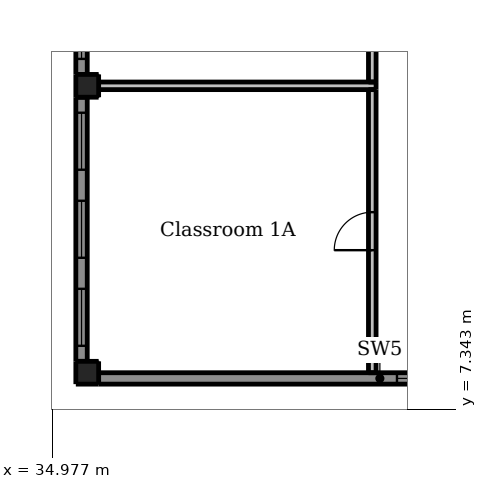
"""IFC4 building model, lengths in metres.
Left out: names, types, materials, properties, quantities, classifications, styles, units other than length and angle.
Written with IfcOpenShell. Run it as: python <this file> out.ifc"""

import sys

from ifc_helpers import new_model, si_unit, direction, frame, frame_2d, origin, origin_2d, place, context, subcontext, project, spatial, rectangle, extrude, element, fill, save


model = new_model("IFC4")
c1 = context("Model", 3, precision=1e-05, world=origin(), true_north=direction((0.0, 1.0)))
c2 = subcontext(c1, "Body", "Model", "MODEL_VIEW")
j1 = project(units=[si_unit("LENGTHUNIT", "METRE"), si_unit("PLANEANGLEUNIT", "RADIAN")], contexts=[c1])
p1 = place(None, origin())
s1 = spatial("IfcSite", under=j1, at=p1, CompositionType="ELEMENT")
p2 = place(p1, origin())
s2 = spatial("IfcBuilding", under=s1, at=p2, CompositionType="ELEMENT")
p3 = place(p2, frame((0.0, 0.0, 5.5)))
s3 = spatial("IfcBuildingStorey", under=s2, at=p3, CompositionType="ELEMENT", Elevation=5.5)
for number, where, z_axis, x_axis in (
    (1, (35.9, 8.3, -0.3), (0.0, 0.0, 1.0), (1.0, 0.0, 0.0)),
    (2, (35.9, 15.85, -0.3), (0.0, 0.0, 1.0), (1.0, 0.0, 0.0)),
):
    element("IfcColumn", number, at=place(p3, frame(where, z_axis=z_axis, x_axis=x_axis)), inside=s3, PredefinedType="COLUMN", context=c2, shape_type="SweptSolid", body=[
        extrude(rectangle(XDim=0.6, YDim=0.6, at=origin_2d()), origin(), (0.0, 0.0, 1.0), 4.5),
    ])
p4 = place(p3, frame((35.75, 8.6, 0.0), z_axis=(0.0, 0.0, 1.0), x_axis=(0.0, 1.0, 0.0)))
e3 = element("IfcWall", 3, at=p4, inside=s3, PredefinedType="SOLIDWALL", context=c2, shape_type="SweptSolid", body=[
    extrude(rectangle(XDim=6.95, YDim=0.3, at=frame_2d((3.475, 0.0))), origin(), (0.0, 0.0, 1.0), 3.3),
])
p5 = place(p4, frame((0.408, 0.0, 0.9)))
e4 = element("IfcOpeningElement", 4, at=p5, cuts=e3, PredefinedType="OPENING", context=c2, shape_type="SweptSolid", body=[
    extrude(rectangle(XDim=1.5, YDim=1.5, at=frame_2d((0.75, 0.75))), frame((0.0, 0.16, 0.0), z_axis=(0.0, -1.0, 0.0), x_axis=(1.0, 0.0, 0.0)), (0.0, 0.0, 1.0), 0.32),
])
p6 = place(p4, frame((2.725, 0.0, 0.9)))
e5 = element("IfcOpeningElement", 5, at=p6, cuts=e3, PredefinedType="OPENING", context=c2, shape_type="SweptSolid", body=[
    extrude(rectangle(XDim=1.5, YDim=1.5, at=frame_2d((0.75, 0.75))), frame((0.0, 0.16, 0.0), z_axis=(0.0, -1.0, 0.0), x_axis=(1.0, 0.0, 0.0)), (0.0, 0.0, 1.0), 0.32),
])
p7 = place(p4, frame((5.042, 0.0, 0.9)))
e6 = element("IfcOpeningElement", 6, at=p7, cuts=e3, PredefinedType="OPENING", context=c2, shape_type="SweptSolid", body=[
    extrude(rectangle(XDim=1.5, YDim=1.5, at=frame_2d((0.75, 0.75))), frame((0.0, 0.16, 0.0), z_axis=(0.0, -1.0, 0.0), x_axis=(1.0, 0.0, 0.0)), (0.0, 0.0, 1.0), 0.32),
])
p8 = place(p3, frame((35.75, 16.15, 0.0), z_axis=(0.0, 0.0, 1.0), x_axis=(0.0, 1.0, 0.0)))
e7 = element("IfcWall", 7, at=p8, inside=s3, PredefinedType="SOLIDWALL", context=c2, shape_type="SweptSolid", body=[
    extrude(rectangle(XDim=6.95, YDim=0.3, at=frame_2d((3.475, 0.0))), origin(), (0.0, 0.0, 1.0), 3.3),
])
p9 = place(p8, frame((0.408, 0.0, 0.9)))
e8 = element("IfcOpeningElement", 8, at=p9, cuts=e7, PredefinedType="OPENING", context=c2, shape_type="SweptSolid", body=[
    extrude(rectangle(XDim=1.5, YDim=1.5, at=frame_2d((0.75, 0.75))), frame((0.0, 0.16, 0.0), z_axis=(0.0, -1.0, 0.0), x_axis=(1.0, 0.0, 0.0)), (0.0, 0.0, 1.0), 0.32),
])
p10 = place(p8, frame((2.725, 0.0, 0.9)))
e9 = element("IfcOpeningElement", 9, at=p10, cuts=e7, PredefinedType="OPENING", context=c2, shape_type="SweptSolid", body=[
    extrude(rectangle(XDim=1.5, YDim=1.5, at=frame_2d((0.75, 0.75))), frame((0.0, 0.16, 0.0), z_axis=(0.0, -1.0, 0.0), x_axis=(1.0, 0.0, 0.0)), (0.0, 0.0, 1.0), 0.32),
])
p11 = place(p8, frame((5.042, 0.0, 0.9)))
e10 = element("IfcOpeningElement", 10, at=p11, cuts=e7, PredefinedType="OPENING", context=c2, shape_type="SweptSolid", body=[
    extrude(rectangle(XDim=1.5, YDim=1.5, at=frame_2d((0.75, 0.75))), frame((0.0, 0.16, 0.0), z_axis=(0.0, -1.0, 0.0), x_axis=(1.0, 0.0, 0.0)), (0.0, 0.0, 1.0), 0.32),
])
p12 = place(p3, frame((36.2, 8.15, 0.0), z_axis=(0.0, 0.0, 1.0), x_axis=(1.0, 0.0, 0.0)))
e11 = element("IfcWall", 11, at=p12, inside=s3, PredefinedType="SOLIDWALL", context=c2, shape_type="SweptSolid", body=[
    extrude(rectangle(XDim=14.8, YDim=0.3, at=frame_2d((7.4, 0.0))), origin(), (0.0, 0.0, 1.0), 3.1),
])
p13 = place(p12, frame((7.85, 0.0, 0.9)))
e12 = element("IfcOpeningElement", 12, at=p13, cuts=e11, PredefinedType="OPENING", context=c2, shape_type="SweptSolid", body=[
    extrude(rectangle(XDim=1.5, YDim=1.5, at=frame_2d((0.75, 0.75))), frame((0.0, 0.16, 0.0), z_axis=(0.0, -1.0, 0.0), x_axis=(1.0, 0.0, 0.0)), (0.0, 0.0, 1.0), 0.32),
])
p14 = place(p3, frame((43.4, 8.3, 0.0), z_axis=(0.0, 0.0, 1.0), x_axis=(0.0, 1.0, 0.0)))
e13 = element("IfcWall", 13, at=p14, inside=s3, PredefinedType="PARTITIONING", context=c2, shape_type="SweptSolid", body=[
    extrude(rectangle(XDim=7.45, YDim=0.2, at=frame_2d((3.725, 0.0))), origin(), (0.0, 0.0, 1.0), 3.1),
])
p15 = place(p14, frame((3.225, 0.0, 0.0)))
e14 = element("IfcOpeningElement", 14, at=p15, cuts=e13, PredefinedType="OPENING", context=c2, shape_type="SweptSolid", body=[
    extrude(rectangle(XDim=1.0, YDim=2.1, at=frame_2d((0.5, 1.05))), frame((0.0, 0.11, 0.0), z_axis=(0.0, -1.0, 0.0), x_axis=(1.0, 0.0, 0.0)), (0.0, 0.0, 1.0), 0.22),
])
p16 = place(p3, frame((43.4, 15.95, 0.0), z_axis=(0.0, 0.0, 1.0), x_axis=(0.0, 1.0, 0.0)))
e15 = element("IfcWall", 15, at=p16, inside=s3, PredefinedType="PARTITIONING", context=c2, shape_type="SweptSolid", body=[
    extrude(rectangle(XDim=7.35, YDim=0.2, at=frame_2d((3.675, 0.0))), origin(), (0.0, 0.0, 1.0), 3.1),
])
p17 = place(p16, frame((3.175, 0.0, 0.0)))
e16 = element("IfcOpeningElement", 16, at=p17, cuts=e15, PredefinedType="OPENING", context=c2, shape_type="SweptSolid", body=[
    extrude(rectangle(XDim=1.0, YDim=2.1, at=frame_2d((0.5, 1.05))), frame((0.0, 0.11, 0.0), z_axis=(0.0, -1.0, 0.0), x_axis=(1.0, 0.0, 0.0)), (0.0, 0.0, 1.0), 0.22),
])
p18 = place(p3, frame((36.2, 15.85, 0.0), z_axis=(0.0, 0.0, 1.0), x_axis=(1.0, 0.0, 0.0)))
e17 = element("IfcWall", 17, at=p18, inside=s3, PredefinedType="PARTITIONING", context=c2, shape_type="SweptSolid", body=[
    extrude(rectangle(XDim=7.3, YDim=0.2, at=frame_2d((3.65, 0.0))), origin(), (0.0, 0.0, 1.0), 3.1),
])
p19 = place(p5, origin())
e18 = element("IfcWindow", 18, at=p19, inside=s3, PartitioningType="DOUBLE_PANEL_HORIZONTAL", PredefinedType="WINDOW", context=c2, shape_type="SweptSolid", body=[
    extrude(rectangle(XDim=1.5, YDim=1.5, at=frame_2d((0.75, 0.75))), frame((0.0, 0.03, 0.0), z_axis=(0.0, -1.0, 0.0), x_axis=(1.0, 0.0, 0.0)), (0.0, 0.0, 1.0), 0.06),
])
fill(e4, e18)
p20 = place(p6, origin())
e19 = element("IfcWindow", 19, at=p20, inside=s3, PartitioningType="DOUBLE_PANEL_HORIZONTAL", PredefinedType="WINDOW", context=c2, shape_type="SweptSolid", body=[
    extrude(rectangle(XDim=1.5, YDim=1.5, at=frame_2d((0.75, 0.75))), frame((0.0, 0.03, 0.0), z_axis=(0.0, -1.0, 0.0), x_axis=(1.0, 0.0, 0.0)), (0.0, 0.0, 1.0), 0.06),
])
fill(e5, e19)
p21 = place(p7, origin())
e20 = element("IfcWindow", 20, at=p21, inside=s3, PartitioningType="DOUBLE_PANEL_HORIZONTAL", PredefinedType="WINDOW", context=c2, shape_type="SweptSolid", body=[
    extrude(rectangle(XDim=1.5, YDim=1.5, at=frame_2d((0.75, 0.75))), frame((0.0, 0.03, 0.0), z_axis=(0.0, -1.0, 0.0), x_axis=(1.0, 0.0, 0.0)), (0.0, 0.0, 1.0), 0.06),
])
fill(e6, e20)
p22 = place(p9, origin())
e21 = element("IfcWindow", 21, at=p22, inside=s3, PartitioningType="DOUBLE_PANEL_HORIZONTAL", PredefinedType="WINDOW", context=c2, shape_type="SweptSolid", body=[
    extrude(rectangle(XDim=1.5, YDim=1.5, at=frame_2d((0.75, 0.75))), frame((0.0, 0.03, 0.0), z_axis=(0.0, -1.0, 0.0), x_axis=(1.0, 0.0, 0.0)), (0.0, 0.0, 1.0), 0.06),
])
fill(e8, e21)
p23 = place(p13, origin())
e22 = element("IfcWindow", 22, at=p23, inside=s3, PartitioningType="DOUBLE_PANEL_HORIZONTAL", PredefinedType="WINDOW", context=c2, shape_type="SweptSolid", body=[
    extrude(rectangle(XDim=1.5, YDim=1.5, at=frame_2d((0.75, 0.75))), frame((0.0, 0.03, 0.0), z_axis=(0.0, -1.0, 0.0), x_axis=(1.0, 0.0, 0.0)), (0.0, 0.0, 1.0), 0.06),
])
fill(e12, e22)
p24 = place(p15, origin())
e23 = element("IfcDoor", 23, at=p24, inside=s3, OperationType="SINGLE_SWING_LEFT", PredefinedType="DOOR", context=c2, shape_type="SweptSolid", body=[
    extrude(rectangle(XDim=1.0, YDim=2.1, at=frame_2d((0.5, 1.05))), frame((0.0, 0.025, 0.0), z_axis=(0.0, -1.0, 0.0), x_axis=(1.0, 0.0, 0.0)), (0.0, 0.0, 1.0), 0.05),
])
fill(e14, e23)
save(model, sys.argv[1])
